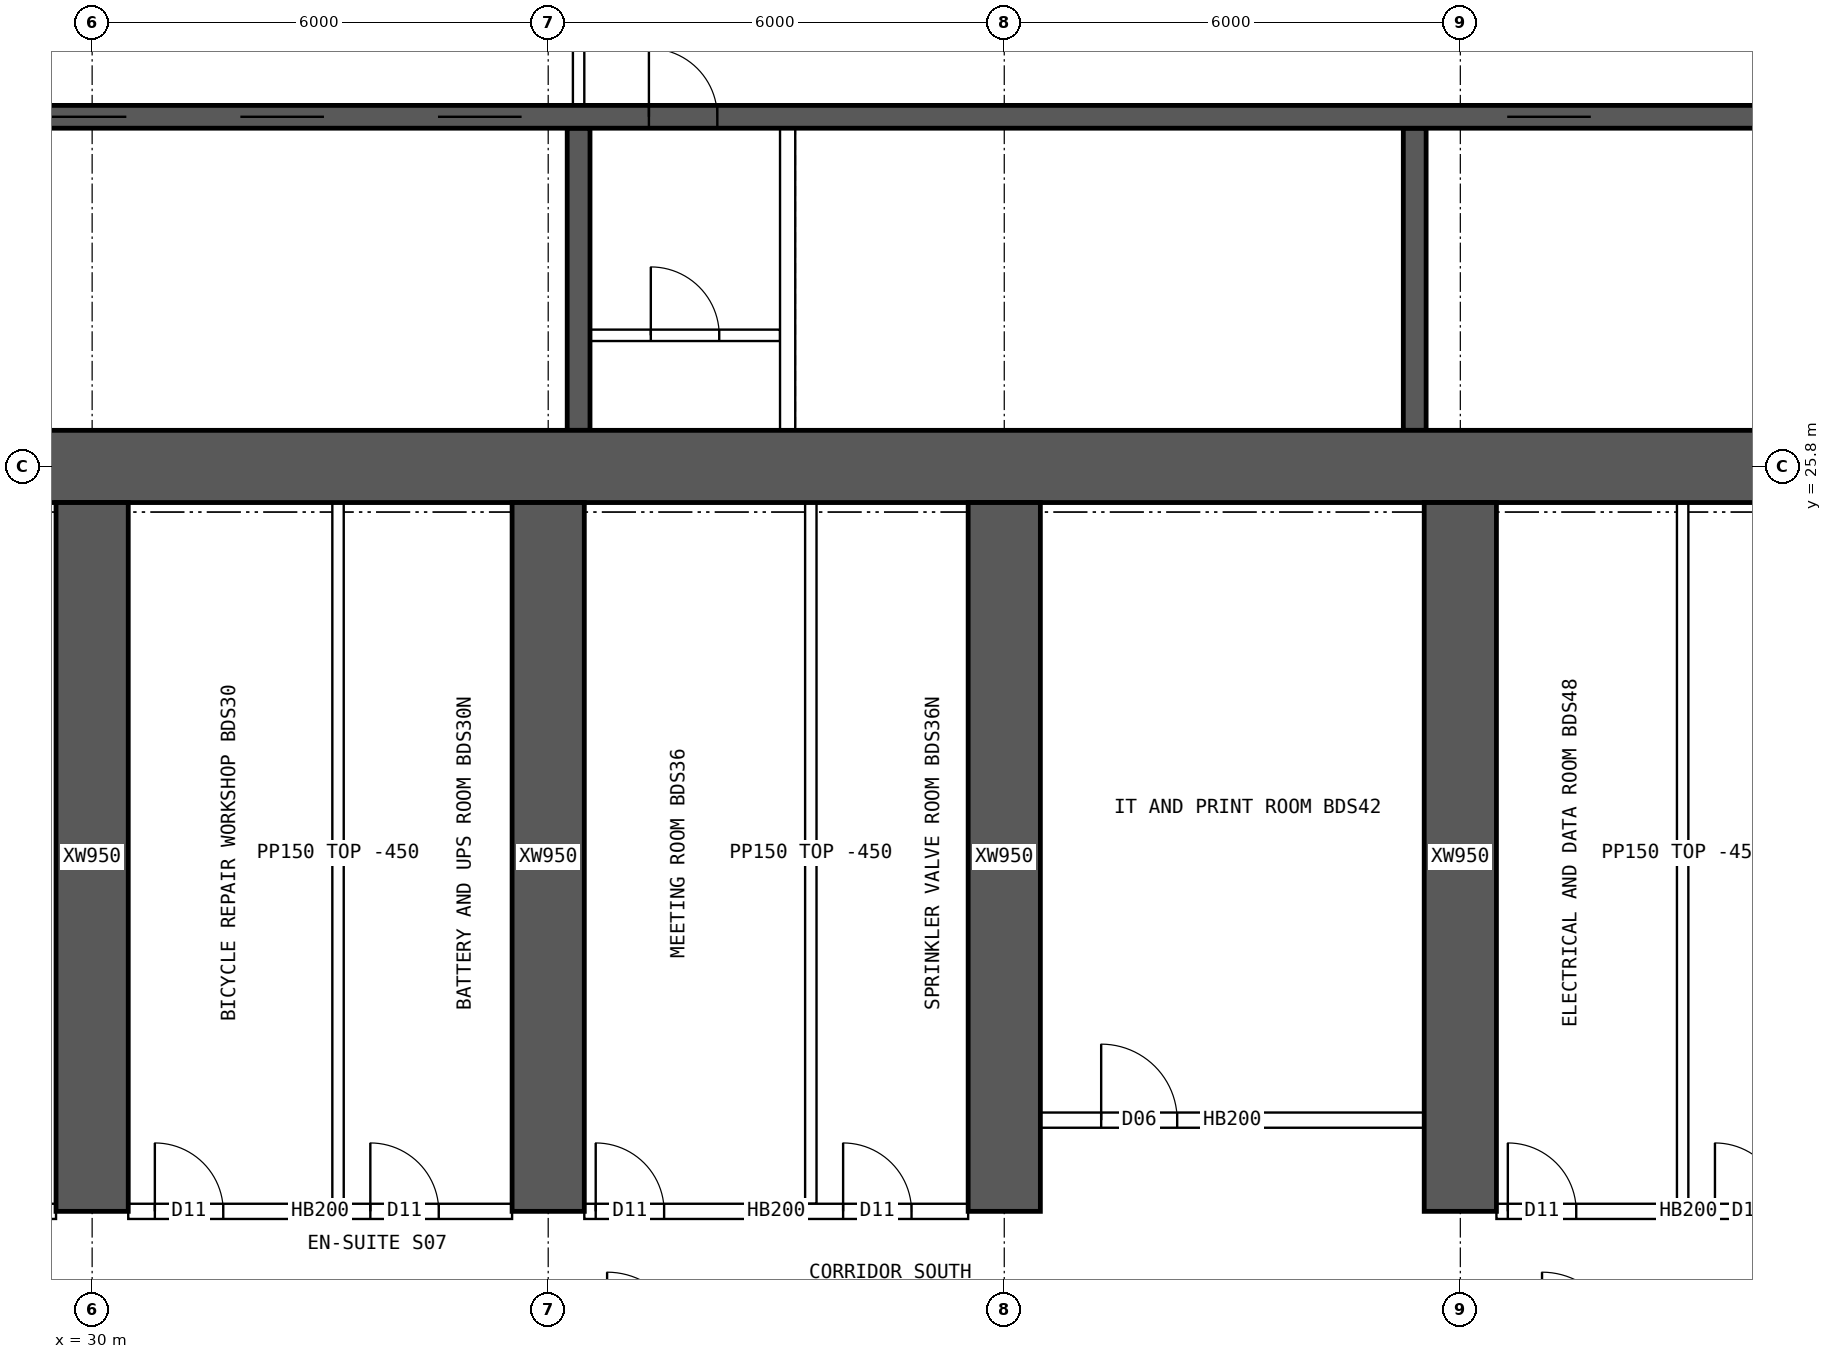
"""IFC4 building model, lengths in metres.
Left out: names, types, materials, properties, quantities, classifications, styles, units other than length and angle.
Written with IfcOpenShell. Run it as: python <this file> out.ifc"""

import sys

from ifc_helpers import new_model, si_unit, direction, frame, frame_2d, origin, place, context, subcontext, project, spatial, rectangle, extrude, element, fill, save


model = new_model("IFC4")
c1 = context("Model", 3, precision=1e-05, world=origin(), true_north=direction((0.0, 1.0)))
c2 = subcontext(c1, "Body", "Model", "MODEL_VIEW")
j1 = project(units=[si_unit("LENGTHUNIT", "METRE"), si_unit("PLANEANGLEUNIT", "RADIAN")], contexts=[c1])
p1 = place(None, origin())
s1 = spatial("IfcSite", under=j1, at=p1, CompositionType="ELEMENT")
p2 = place(p1, origin())
s2 = spatial("IfcBuilding", under=s1, at=p2, CompositionType="ELEMENT")
p3 = place(p2, frame((0.0, 0.0, 95.65)))
s3 = spatial("IfcBuildingStorey", under=s2, at=p3, CompositionType="ELEMENT", Elevation=95.65)
p4 = place(p3, frame((18.0, 25.8, 0.0), z_axis=(0.0, 0.0, 1.0), x_axis=(1.0, 0.0, 0.0)))
e1 = element("IfcWall", 1, at=p4, inside=s3, PredefinedType="SHEAR", context=c2, shape_type="SweptSolid", body=[
    extrude(rectangle(XDim=48.0, YDim=0.95, at=frame_2d((24.0, 0.0))), origin(), (0.0, 0.0, 1.0), 3.75),
])
p5 = place(p3, frame((18.475, 30.4, 0.0), z_axis=(0.0, 0.0, 1.0), x_axis=(1.0, 0.0, 0.0)))
e2 = element("IfcWall", 2, at=p5, inside=s3, PredefinedType="SHEAR", context=c2, shape_type="SweptSolid", body=[
    extrude(rectangle(XDim=47.05, YDim=0.3, at=frame_2d((23.525, 0.0))), origin(), (0.0, 0.0, 1.0), 3.75),
])
p6 = place(p5, frame((0.4, 0.0, 0.0)))
e3 = element("IfcOpeningElement", 3, at=p6, cuts=e2, PredefinedType="OPENING", context=c2, shape_type="SweptSolid", body=[
    extrude(rectangle(XDim=1.0, YDim=2.1, at=frame_2d((0.5, 1.05))), frame((0.0, 0.16, 0.0), z_axis=(0.0, -1.0, 0.0), x_axis=(1.0, 0.0, 0.0)), (0.0, 0.0, 1.0), 0.32),
])
p7 = place(p5, frame((45.65, 0.0, 0.0)))
e4 = element("IfcOpeningElement", 4, at=p7, cuts=e2, PredefinedType="OPENING", context=c2, shape_type="SweptSolid", body=[
    extrude(rectangle(XDim=1.0, YDim=2.1, at=frame_2d((0.5, 1.05))), frame((0.0, 0.16, 0.0), z_axis=(0.0, -1.0, 0.0), x_axis=(1.0, 0.0, 0.0)), (0.0, 0.0, 1.0), 0.32),
])
p8 = place(p5, frame((8.275, 0.0, 0.0)))
e5 = element("IfcOpeningElement", 5, at=p8, cuts=e2, PredefinedType="OPENING", context=c2, shape_type="SweptSolid", body=[
    extrude(rectangle(XDim=1.1, YDim=2.1, at=frame_2d((0.55, 1.05))), frame((0.0, 0.16, 0.0), z_axis=(0.0, -1.0, 0.0), x_axis=(1.0, 0.0, 0.0)), (0.0, 0.0, 1.0), 0.32),
])
p9 = place(p5, frame((10.875, 0.0, 0.0)))
e6 = element("IfcOpeningElement", 6, at=p9, cuts=e2, PredefinedType="OPENING", context=c2, shape_type="SweptSolid", body=[
    extrude(rectangle(XDim=1.1, YDim=2.1, at=frame_2d((0.55, 1.05))), frame((0.0, 0.16, 0.0), z_axis=(0.0, -1.0, 0.0), x_axis=(1.0, 0.0, 0.0)), (0.0, 0.0, 1.0), 0.32),
])
p10 = place(p5, frame((13.475, 0.0, 0.0)))
e7 = element("IfcOpeningElement", 7, at=p10, cuts=e2, PredefinedType="OPENING", context=c2, shape_type="SweptSolid", body=[
    extrude(rectangle(XDim=1.1, YDim=2.1, at=frame_2d((0.55, 1.05))), frame((0.0, 0.16, 0.0), z_axis=(0.0, -1.0, 0.0), x_axis=(1.0, 0.0, 0.0)), (0.0, 0.0, 1.0), 0.32),
])
p11 = place(p5, frame((16.075, 0.0, 0.0)))
e8 = element("IfcOpeningElement", 8, at=p11, cuts=e2, PredefinedType="OPENING", context=c2, shape_type="SweptSolid", body=[
    extrude(rectangle(XDim=1.1, YDim=2.1, at=frame_2d((0.55, 1.05))), frame((0.0, 0.16, 0.0), z_axis=(0.0, -1.0, 0.0), x_axis=(1.0, 0.0, 0.0)), (0.0, 0.0, 1.0), 0.32),
])
p12 = place(p5, frame((18.85, 0.0, 0.0)))
e9 = element("IfcOpeningElement", 9, at=p12, cuts=e2, PredefinedType="OPENING", context=c2, shape_type="SweptSolid", body=[
    extrude(rectangle(XDim=0.9, YDim=2.1, at=frame_2d((0.45, 1.05))), frame((0.0, 0.16, 0.0), z_axis=(0.0, -1.0, 0.0), x_axis=(1.0, 0.0, 0.0)), (0.0, 0.0, 1.0), 0.32),
])
p13 = place(p5, frame((30.142, 0.0, 0.0)))
e10 = element("IfcOpeningElement", 10, at=p13, cuts=e2, PredefinedType="OPENING", context=c2, shape_type="SweptSolid", body=[
    extrude(rectangle(XDim=1.1, YDim=2.1, at=frame_2d((0.55, 1.05))), frame((0.0, 0.16, 0.0), z_axis=(0.0, -1.0, 0.0), x_axis=(1.0, 0.0, 0.0)), (0.0, 0.0, 1.0), 0.32),
])
p14 = place(p5, frame((33.675, 0.0, 0.0)))
e11 = element("IfcOpeningElement", 11, at=p14, cuts=e2, PredefinedType="OPENING", context=c2, shape_type="SweptSolid", body=[
    extrude(rectangle(XDim=1.1, YDim=2.1, at=frame_2d((0.55, 1.05))), frame((0.0, 0.16, 0.0), z_axis=(0.0, -1.0, 0.0), x_axis=(1.0, 0.0, 0.0)), (0.0, 0.0, 1.0), 0.32),
])
p15 = place(p5, frame((37.208, 0.0, 0.0)))
e12 = element("IfcOpeningElement", 12, at=p15, cuts=e2, PredefinedType="OPENING", context=c2, shape_type="SweptSolid", body=[
    extrude(rectangle(XDim=1.1, YDim=2.1, at=frame_2d((0.55, 1.05))), frame((0.0, 0.16, 0.0), z_axis=(0.0, -1.0, 0.0), x_axis=(1.0, 0.0, 0.0)), (0.0, 0.0, 1.0), 0.32),
])
for number, where, z_axis, x_axis in (
    (13, (36.4, 26.275, 0.0), (0.0, 0.0, 1.0), (0.0, 1.0, 0.0)),
    (14, (47.4, 26.275, 0.0), (0.0, 0.0, 1.0), (0.0, 1.0, 0.0)),
):
    element("IfcWall", number, at=place(p3, frame(where, z_axis=z_axis, x_axis=x_axis)), inside=s3, PredefinedType="SHEAR", context=c2, shape_type="SweptSolid", body=[
        extrude(rectangle(XDim=3.975, YDim=0.3, at=frame_2d((1.988, 0.0))), origin(), (0.0, 0.0, 1.0), 3.75),
    ])
for number, where, z_axis, x_axis in (
    (15, (30.0, 16.0, 0.0), (0.0, 0.0, 1.0), (0.0, 1.0, 0.0)),
    (16, (36.0, 16.0, 0.0), (0.0, 0.0, 1.0), (0.0, 1.0, 0.0)),
    (17, (42.0, 16.0, 0.0), (0.0, 0.0, 1.0), (0.0, 1.0, 0.0)),
    (18, (48.0, 16.0, 0.0), (0.0, 0.0, 1.0), (0.0, 1.0, 0.0)),
):
    element("IfcWall", number, at=place(p3, frame(where, z_axis=z_axis, x_axis=x_axis)), inside=s3, PredefinedType="SHEAR", context=c2, shape_type="SweptSolid", body=[
        extrude(rectangle(XDim=9.325, YDim=0.95, at=frame_2d((4.663, 0.0))), origin(), (0.0, 0.0, 1.0), 3.75),
    ])
p16 = place(p3, frame((36.4, 30.55, 0.0), z_axis=(0.0, 0.0, 1.0), x_axis=(0.0, 1.0, 0.0)))
e19 = element("IfcWall", 19, at=p16, inside=s3, PredefinedType="SOLIDWALL", context=c2, shape_type="SweptSolid", body=[
    extrude(rectangle(XDim=3.9, YDim=0.15, at=frame_2d((1.95, 0.0))), origin(), (0.0, 0.0, 1.0), 3.3),
])
p17 = place(p16, frame((1.15, 0.0, 0.0)))
e20 = element("IfcOpeningElement", 20, at=p17, cuts=e19, PredefinedType="OPENING", context=c2, shape_type="SweptSolid", body=[
    extrude(rectangle(XDim=1.6, YDim=2.1, at=frame_2d((0.8, 1.05))), frame((0.0, 0.085, 0.0), z_axis=(0.0, -1.0, 0.0), x_axis=(1.0, 0.0, 0.0)), (0.0, 0.0, 1.0), 0.17),
])
p18 = place(p3, frame((36.55, 27.525, 0.0), z_axis=(0.0, 0.0, 1.0), x_axis=(1.0, 0.0, 0.0)))
e21 = element("IfcWall", 21, at=p18, inside=s3, PredefinedType="SOLIDWALL", context=c2, shape_type="SweptSolid", body=[
    extrude(rectangle(XDim=2.5, YDim=0.15, at=frame_2d((1.25, 0.0))), origin(), (0.0, 0.0, 1.0), 3.3),
])
p19 = place(p18, frame((0.8, 0.0, 0.0)))
e22 = element("IfcOpeningElement", 22, at=p19, cuts=e21, PredefinedType="OPENING", context=c2, shape_type="SweptSolid", body=[
    extrude(rectangle(XDim=0.9, YDim=2.1, at=frame_2d((0.45, 1.05))), frame((0.0, 0.085, 0.0), z_axis=(0.0, -1.0, 0.0), x_axis=(1.0, 0.0, 0.0)), (0.0, 0.0, 1.0), 0.17),
])
p20 = place(p3, frame((39.15, 26.275, 0.0), z_axis=(0.0, 0.0, 1.0), x_axis=(0.0, 1.0, 0.0)))
e23 = element("IfcWall", 23, at=p20, inside=s3, PredefinedType="SOLIDWALL", context=c2, shape_type="SweptSolid", body=[
    extrude(rectangle(XDim=3.975, YDim=0.2, at=frame_2d((1.988, 0.0))), origin(), (0.0, 0.0, 1.0), 3.3),
])
p21 = place(p3, frame((24.475, 16.0, 0.0), z_axis=(0.0, 0.0, 1.0), x_axis=(1.0, 0.0, 0.0)))
e24 = element("IfcWall", 24, at=p21, inside=s3, PredefinedType="SOLIDWALL", context=c2, shape_type="SweptSolid", body=[
    extrude(rectangle(XDim=5.05, YDim=0.2, at=frame_2d((2.525, 0.0))), origin(), (0.0, 0.0, 1.0), 3.3),
])
p22 = place(p21, frame((0.4, 0.0, 0.0)))
e25 = element("IfcOpeningElement", 25, at=p22, cuts=e24, PredefinedType="OPENING", context=c2, shape_type="SweptSolid", body=[
    extrude(rectangle(XDim=1.0, YDim=2.1, at=frame_2d((0.5, 1.05))), frame((0.0, 0.11, 0.0), z_axis=(0.0, -1.0, 0.0), x_axis=(1.0, 0.0, 0.0)), (0.0, 0.0, 1.0), 0.22),
])
p23 = place(p3, frame((30.475, 16.0, 0.0), z_axis=(0.0, 0.0, 1.0), x_axis=(1.0, 0.0, 0.0)))
e26 = element("IfcWall", 26, at=p23, inside=s3, PredefinedType="SOLIDWALL", context=c2, shape_type="SweptSolid", body=[
    extrude(rectangle(XDim=5.05, YDim=0.2, at=frame_2d((2.525, 0.0))), origin(), (0.0, 0.0, 1.0), 3.3),
])
p24 = place(p23, frame((0.35, 0.0, 0.0)))
e27 = element("IfcOpeningElement", 27, at=p24, cuts=e26, PredefinedType="OPENING", context=c2, shape_type="SweptSolid", body=[
    extrude(rectangle(XDim=0.9, YDim=2.1, at=frame_2d((0.45, 1.05))), frame((0.0, 0.11, 0.0), z_axis=(0.0, -1.0, 0.0), x_axis=(1.0, 0.0, 0.0)), (0.0, 0.0, 1.0), 0.22),
])
p25 = place(p23, frame((3.185, 0.0, 0.0)))
e28 = element("IfcOpeningElement", 28, at=p25, cuts=e26, PredefinedType="OPENING", context=c2, shape_type="SweptSolid", body=[
    extrude(rectangle(XDim=0.9, YDim=2.1, at=frame_2d((0.45, 1.05))), frame((0.0, 0.11, 0.0), z_axis=(0.0, -1.0, 0.0), x_axis=(1.0, 0.0, 0.0)), (0.0, 0.0, 1.0), 0.22),
])
p26 = place(p3, frame((36.475, 16.0, 0.0), z_axis=(0.0, 0.0, 1.0), x_axis=(1.0, 0.0, 0.0)))
e29 = element("IfcWall", 29, at=p26, inside=s3, PredefinedType="SOLIDWALL", context=c2, shape_type="SweptSolid", body=[
    extrude(rectangle(XDim=5.05, YDim=0.2, at=frame_2d((2.525, 0.0))), origin(), (0.0, 0.0, 1.0), 3.3),
])
p27 = place(p26, frame((0.15, 0.0, 0.0)))
e30 = element("IfcOpeningElement", 30, at=p27, cuts=e29, PredefinedType="OPENING", context=c2, shape_type="SweptSolid", body=[
    extrude(rectangle(XDim=0.9, YDim=2.1, at=frame_2d((0.45, 1.05))), frame((0.0, 0.11, 0.0), z_axis=(0.0, -1.0, 0.0), x_axis=(1.0, 0.0, 0.0)), (0.0, 0.0, 1.0), 0.22),
])
p28 = place(p26, frame((3.405, 0.0, 0.0)))
e31 = element("IfcOpeningElement", 31, at=p28, cuts=e29, PredefinedType="OPENING", context=c2, shape_type="SweptSolid", body=[
    extrude(rectangle(XDim=0.9, YDim=2.1, at=frame_2d((0.45, 1.05))), frame((0.0, 0.11, 0.0), z_axis=(0.0, -1.0, 0.0), x_axis=(1.0, 0.0, 0.0)), (0.0, 0.0, 1.0), 0.22),
])
p29 = place(p3, frame((48.475, 16.0, 0.0), z_axis=(0.0, 0.0, 1.0), x_axis=(1.0, 0.0, 0.0)))
e32 = element("IfcWall", 32, at=p29, inside=s3, PredefinedType="SOLIDWALL", context=c2, shape_type="SweptSolid", body=[
    extrude(rectangle(XDim=5.05, YDim=0.2, at=frame_2d((2.525, 0.0))), origin(), (0.0, 0.0, 1.0), 3.3),
])
p30 = place(p29, frame((0.15, 0.0, 0.0)))
e33 = element("IfcOpeningElement", 33, at=p30, cuts=e32, PredefinedType="OPENING", context=c2, shape_type="SweptSolid", body=[
    extrude(rectangle(XDim=0.9, YDim=2.1, at=frame_2d((0.45, 1.05))), frame((0.0, 0.11, 0.0), z_axis=(0.0, -1.0, 0.0), x_axis=(1.0, 0.0, 0.0)), (0.0, 0.0, 1.0), 0.22),
])
p31 = place(p29, frame((2.875, 0.0, 0.0)))
e34 = element("IfcOpeningElement", 34, at=p31, cuts=e32, PredefinedType="OPENING", context=c2, shape_type="SweptSolid", body=[
    extrude(rectangle(XDim=0.9, YDim=2.1, at=frame_2d((0.45, 1.05))), frame((0.0, 0.11, 0.0), z_axis=(0.0, -1.0, 0.0), x_axis=(1.0, 0.0, 0.0)), (0.0, 0.0, 1.0), 0.22),
])
for number, where, z_axis, x_axis in (
    (35, (33.235, 16.1, 0.0), (0.0, 0.0, 1.0), (0.0, 1.0, 0.0)),
    (36, (39.455, 16.1, 0.0), (0.0, 0.0, 1.0), (0.0, 1.0, 0.0)),
):
    element("IfcWall", number, at=place(p3, frame(where, z_axis=z_axis, x_axis=x_axis)), inside=s3, PredefinedType="PARTITIONING", context=c2, shape_type="SweptSolid", body=[
        extrude(rectangle(XDim=9.225, YDim=0.15, at=frame_2d((4.612, 0.0))), origin(), (0.0, 0.0, 1.0), 3.3),
    ])
p32 = place(p3, frame((42.475, 17.2, 0.0), z_axis=(0.0, 0.0, 1.0), x_axis=(1.0, 0.0, 0.0)))
e37 = element("IfcWall", 37, at=p32, inside=s3, PredefinedType="SOLIDWALL", context=c2, shape_type="SweptSolid", body=[
    extrude(rectangle(XDim=5.05, YDim=0.2, at=frame_2d((2.525, 0.0))), origin(), (0.0, 0.0, 1.0), 3.3),
])
p33 = place(p32, frame((0.8, 0.0, 0.0)))
e38 = element("IfcOpeningElement", 38, at=p33, cuts=e37, PredefinedType="OPENING", context=c2, shape_type="SweptSolid", body=[
    extrude(rectangle(XDim=1.0, YDim=2.1, at=frame_2d((0.5, 1.05))), frame((0.0, 0.11, 0.0), z_axis=(0.0, -1.0, 0.0), x_axis=(1.0, 0.0, 0.0)), (0.0, 0.0, 1.0), 0.22),
])
p34 = place(p3, frame((50.925, 16.1, 0.0), z_axis=(0.0, 0.0, 1.0), x_axis=(0.0, 1.0, 0.0)))
e39 = element("IfcWall", 39, at=p34, inside=s3, PredefinedType="PARTITIONING", context=c2, shape_type="SweptSolid", body=[
    extrude(rectangle(XDim=9.225, YDim=0.15, at=frame_2d((4.612, 0.0))), origin(), (0.0, 0.0, 1.0), 3.3),
])
p35 = place(p9, origin())
e40 = element("IfcDoor", 40, at=p35, inside=s3, OperationType="DOUBLE_DOOR_SLIDING", PredefinedType="DOOR", context=c2, shape_type="SweptSolid", body=[
    extrude(rectangle(XDim=1.1, YDim=2.1, at=frame_2d((0.55, 1.05))), frame((0.0, 0.025, 0.0), z_axis=(0.0, -1.0, 0.0), x_axis=(1.0, 0.0, 0.0)), (0.0, 0.0, 1.0), 0.05),
])
fill(e6, e40)
p36 = place(p10, origin())
e41 = element("IfcDoor", 41, at=p36, inside=s3, OperationType="DOUBLE_DOOR_SLIDING", PredefinedType="DOOR", context=c2, shape_type="SweptSolid", body=[
    extrude(rectangle(XDim=1.1, YDim=2.1, at=frame_2d((0.55, 1.05))), frame((0.0, 0.025, 0.0), z_axis=(0.0, -1.0, 0.0), x_axis=(1.0, 0.0, 0.0)), (0.0, 0.0, 1.0), 0.05),
])
fill(e7, e41)
p37 = place(p11, origin())
e42 = element("IfcDoor", 42, at=p37, inside=s3, OperationType="DOUBLE_DOOR_SLIDING", PredefinedType="DOOR", context=c2, shape_type="SweptSolid", body=[
    extrude(rectangle(XDim=1.1, YDim=2.1, at=frame_2d((0.55, 1.05))), frame((0.0, 0.025, 0.0), z_axis=(0.0, -1.0, 0.0), x_axis=(1.0, 0.0, 0.0)), (0.0, 0.0, 1.0), 0.05),
])
fill(e8, e42)
p38 = place(p19, origin())
e43 = element("IfcDoor", 43, at=p38, inside=s3, OperationType="SINGLE_SWING_LEFT", PredefinedType="DOOR", context=c2, shape_type="SweptSolid", body=[
    extrude(rectangle(XDim=0.9, YDim=2.1, at=frame_2d((0.45, 1.05))), frame((0.0, 0.025, 0.0), z_axis=(0.0, -1.0, 0.0), x_axis=(1.0, 0.0, 0.0)), (0.0, 0.0, 1.0), 0.05),
])
fill(e22, e43)
p39 = place(p12, origin())
e44 = element("IfcDoor", 44, at=p39, inside=s3, OperationType="SINGLE_SWING_LEFT", PredefinedType="DOOR", context=c2, shape_type="SweptSolid", body=[
    extrude(rectangle(XDim=0.9, YDim=2.1, at=frame_2d((0.45, 1.05))), frame((0.0, 0.025, 0.0), z_axis=(0.0, -1.0, 0.0), x_axis=(1.0, 0.0, 0.0)), (0.0, 0.0, 1.0), 0.05),
])
fill(e9, e44)
p40 = place(p13, origin())
e45 = element("IfcDoor", 45, at=p40, inside=s3, OperationType="DOUBLE_DOOR_SLIDING", PredefinedType="DOOR", context=c2, shape_type="SweptSolid", body=[
    extrude(rectangle(XDim=1.1, YDim=2.1, at=frame_2d((0.55, 1.05))), frame((0.0, 0.025, 0.0), z_axis=(0.0, -1.0, 0.0), x_axis=(1.0, 0.0, 0.0)), (0.0, 0.0, 1.0), 0.05),
])
fill(e10, e45)
p41 = place(p24, origin())
e46 = element("IfcDoor", 46, at=p41, inside=s3, OperationType="SINGLE_SWING_LEFT", PredefinedType="DOOR", context=c2, shape_type="SweptSolid", body=[
    extrude(rectangle(XDim=0.9, YDim=2.1, at=frame_2d((0.45, 1.05))), frame((0.0, 0.025, 0.0), z_axis=(0.0, -1.0, 0.0), x_axis=(1.0, 0.0, 0.0)), (0.0, 0.0, 1.0), 0.05),
])
fill(e27, e46)
p42 = place(p25, origin())
e47 = element("IfcDoor", 47, at=p42, inside=s3, OperationType="SINGLE_SWING_LEFT", PredefinedType="DOOR", context=c2, shape_type="SweptSolid", body=[
    extrude(rectangle(XDim=0.9, YDim=2.1, at=frame_2d((0.45, 1.05))), frame((0.0, 0.025, 0.0), z_axis=(0.0, -1.0, 0.0), x_axis=(1.0, 0.0, 0.0)), (0.0, 0.0, 1.0), 0.05),
])
fill(e28, e47)
p43 = place(p27, origin())
e48 = element("IfcDoor", 48, at=p43, inside=s3, OperationType="SINGLE_SWING_LEFT", PredefinedType="DOOR", context=c2, shape_type="SweptSolid", body=[
    extrude(rectangle(XDim=0.9, YDim=2.1, at=frame_2d((0.45, 1.05))), frame((0.0, 0.025, 0.0), z_axis=(0.0, -1.0, 0.0), x_axis=(1.0, 0.0, 0.0)), (0.0, 0.0, 1.0), 0.05),
])
fill(e30, e48)
p44 = place(p28, origin())
e49 = element("IfcDoor", 49, at=p44, inside=s3, OperationType="SINGLE_SWING_LEFT", PredefinedType="DOOR", context=c2, shape_type="SweptSolid", body=[
    extrude(rectangle(XDim=0.9, YDim=2.1, at=frame_2d((0.45, 1.05))), frame((0.0, 0.025, 0.0), z_axis=(0.0, -1.0, 0.0), x_axis=(1.0, 0.0, 0.0)), (0.0, 0.0, 1.0), 0.05),
])
fill(e31, e49)
p45 = place(p33, origin())
e50 = element("IfcDoor", 50, at=p45, inside=s3, OperationType="SINGLE_SWING_LEFT", PredefinedType="DOOR", context=c2, shape_type="SweptSolid", body=[
    extrude(rectangle(XDim=1.0, YDim=2.1, at=frame_2d((0.5, 1.05))), frame((0.0, 0.025, 0.0), z_axis=(0.0, -1.0, 0.0), x_axis=(1.0, 0.0, 0.0)), (0.0, 0.0, 1.0), 0.05),
])
fill(e38, e50)
p46 = place(p30, origin())
e51 = element("IfcDoor", 51, at=p46, inside=s3, OperationType="SINGLE_SWING_LEFT", PredefinedType="DOOR", context=c2, shape_type="SweptSolid", body=[
    extrude(rectangle(XDim=0.9, YDim=2.1, at=frame_2d((0.45, 1.05))), frame((0.0, 0.025, 0.0), z_axis=(0.0, -1.0, 0.0), x_axis=(1.0, 0.0, 0.0)), (0.0, 0.0, 1.0), 0.05),
])
fill(e33, e51)
p47 = place(p31, origin())
e52 = element("IfcDoor", 52, at=p47, inside=s3, OperationType="SINGLE_SWING_LEFT", PredefinedType="DOOR", context=c2, shape_type="SweptSolid", body=[
    extrude(rectangle(XDim=0.9, YDim=2.1, at=frame_2d((0.45, 1.05))), frame((0.0, 0.025, 0.0), z_axis=(0.0, -1.0, 0.0), x_axis=(1.0, 0.0, 0.0)), (0.0, 0.0, 1.0), 0.05),
])
fill(e34, e52)
save(model, sys.argv[1])
